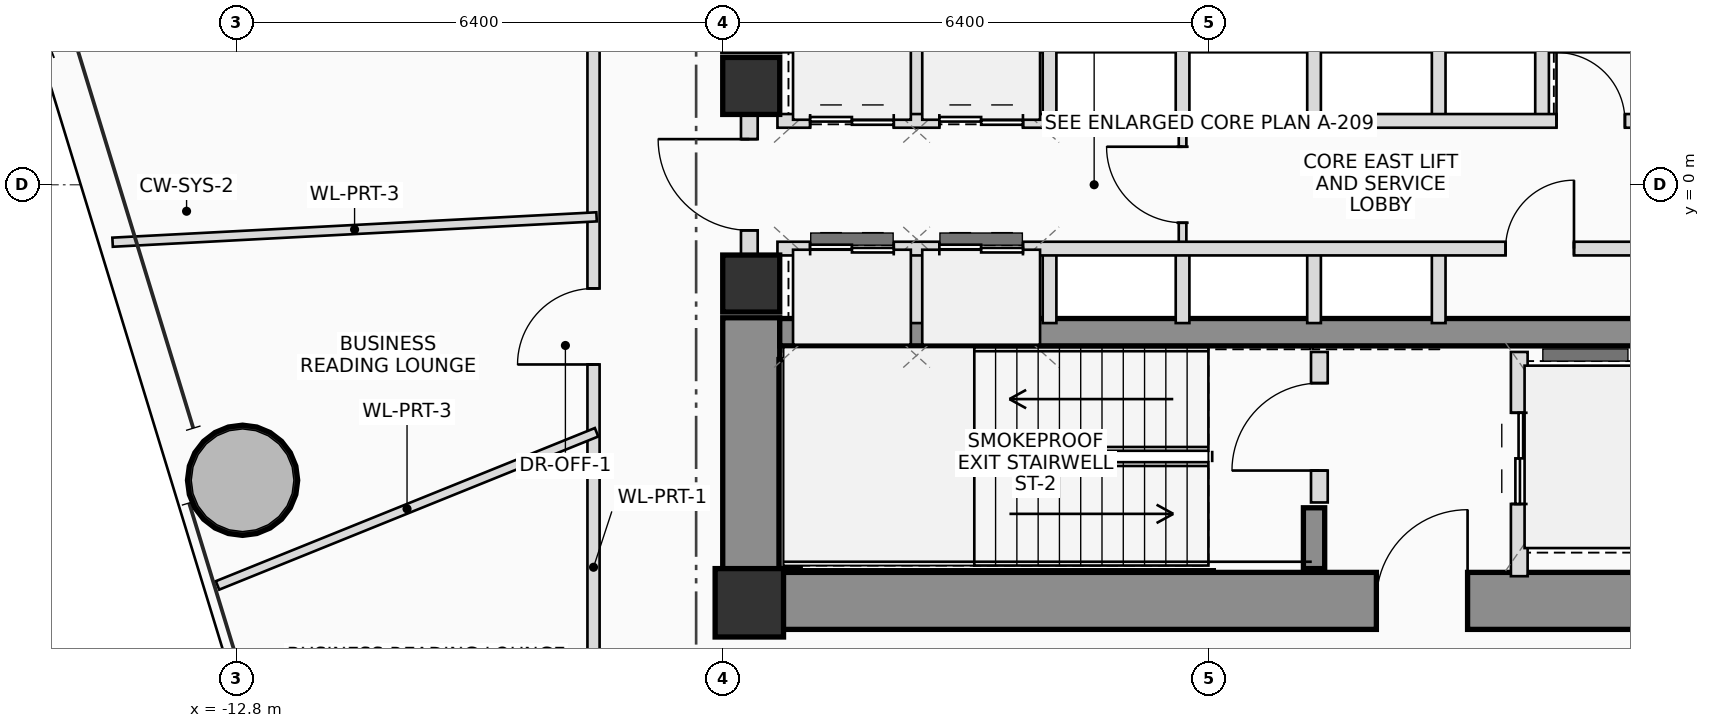
"""IFC4 building model, lengths in metres.
Left out: names, types, materials, properties, quantities, classifications, styles, units other than length and angle.
Written with IfcOpenShell. Run it as: python <this file> out.ifc"""

import sys

from ifc_helpers import new_model, si_unit, direction, frame, frame_2d, origin, origin_2d, place, context, subcontext, project, spatial, rectangle, hollow_circle, extrude, source, transform, mapped, element, fill, save


model = new_model("IFC4")
c1 = context("Model", 3, precision=1e-05, world=origin(), true_north=direction((0.0, 1.0)))
c2 = subcontext(c1, "Body", "Model", "MODEL_VIEW")
j1 = project(units=[si_unit("LENGTHUNIT", "METRE"), si_unit("PLANEANGLEUNIT", "RADIAN")], contexts=[c1])
p1 = place(None, origin())
s1 = spatial("IfcSite", under=j1, at=p1, CompositionType="ELEMENT")
p2 = place(p1, origin())
s2 = spatial("IfcBuilding", under=s1, at=p2, CompositionType="ELEMENT")
p3 = place(p2, frame((0.0, 0.0, 104.9)))
s3 = spatial("IfcBuildingStorey", under=s2, at=p3, CompositionType="ELEMENT", Elevation=104.9)
m1 = source(origin(), c2, "Body", "SweptSolid", [
    extrude(rectangle(XDim=0.9, YDim=0.9, at=origin_2d()), origin(), (0.0, 0.0, 1.0), 3.75),
])
p4 = place(p3, frame((-6.05, -5.5, 0.0), z_axis=(0.0, 0.0, 1.0), x_axis=(1.0, 0.0, 0.0)))
e1 = element("IfcColumn", 1, at=p4, inside=s3, PredefinedType="COLUMN", context=c2, shape_type="MappedRepresentation", body=[
    mapped(m1, transform((0.0, 0.0, 0.0), scale=1.0)),
])
p5 = place(p3, frame((-6.4, -5.475, 0.0), z_axis=(0.0, 0.0, 1.0), x_axis=(1.0, 0.0, 0.0)))
e2 = element("IfcWall", 2, at=p5, inside=s3, PredefinedType="SHEAR", context=c2, shape_type="SweptSolid", body=[
    extrude(rectangle(XDim=12.8, YDim=0.75, at=frame_2d((6.4, 0.0))), origin(), (0.0, 0.0, 1.0), 3.75),
])
p6 = place(p5, frame((8.6, 0.0, 0.0)))
e3 = element("IfcOpeningElement", 3, at=p6, cuts=e2, PredefinedType="OPENING", context=c2, shape_type="SweptSolid", body=[
    extrude(rectangle(XDim=1.2, YDim=2.2, at=frame_2d((0.6, 1.1))), frame((0.0, 0.385, 0.0), z_axis=(0.0, -1.0, 0.0), x_axis=(1.0, 0.0, 0.0)), (0.0, 0.0, 1.0), 0.77),
])
p7 = place(p3, frame((-6.025, -5.1, 0.0), z_axis=(0.0, 0.0, 1.0), x_axis=(0.0, 1.0, 0.0)))
e4 = element("IfcWall", 4, at=p7, inside=s3, PredefinedType="SHEAR", context=c2, shape_type="SweptSolid", body=[
    extrude(rectangle(XDim=3.35, YDim=0.75, at=frame_2d((1.675, 0.0))), origin(), (0.0, 0.0, 1.0), 3.75),
])
p8 = place(p3, frame((-5.65, -1.94, 0.0), z_axis=(0.0, 0.0, 1.0), x_axis=(1.0, 0.0, 0.0)))
e5 = element("IfcWall", 5, at=p8, inside=s3, PredefinedType="SHEAR", context=c2, shape_type="SweptSolid", body=[
    extrude(rectangle(XDim=11.3, YDim=0.36, at=frame_2d((5.65, 0.0))), origin(), (0.0, 0.0, 1.0), 3.75),
])
p9 = place(p3, frame((-5.52, -5.05, 0.0), z_axis=(0.0, 0.0, 1.0), x_axis=(0.0, 1.0, 0.0)))
e6 = element("IfcWall", 6, at=p9, inside=s3, PredefinedType="SHEAR", context=c2, shape_type="SweptSolid", body=[
    extrude(rectangle(XDim=2.75, YDim=0.28, at=frame_2d((1.375, 0.0))), origin(), (0.0, 0.0, 1.0), 3.75),
])
p10 = place(p3, frame((1.38, -5.05, 0.0), z_axis=(0.0, 0.0, 1.0), x_axis=(0.0, 1.0, 0.0)))
e7 = element("IfcWall", 7, at=p10, inside=s3, PredefinedType="SHEAR", context=c2, shape_type="SweptSolid", body=[
    extrude(rectangle(XDim=0.8, YDim=0.28, at=frame_2d((0.4, 0.0))), origin(), (0.0, 0.0, 1.0), 3.75),
])
m2 = source(origin(), c2, "Body", "SweptSolid", [
    extrude(rectangle(XDim=0.75, YDim=0.75, at=origin_2d()), origin(), (0.0, 0.0, 1.0), 3.75),
])
for number, where, z_axis, x_axis in (
    (8, (-6.025, -1.3, 0.0), (0.0, 0.0, 1.0), (1.0, 0.0, 0.0)),
    (9, (-6.025, 1.3, 0.0), (0.0, 0.0, 1.0), (1.0, 0.0, 0.0)),
):
    element("IfcColumn", number, at=place(p3, frame(where, z_axis=z_axis, x_axis=x_axis)), inside=s3, PredefinedType="COLUMN", context=c2, shape_type="MappedRepresentation", body=[
        mapped(m2, transform((0.0, 0.0, 0.0), scale=1.0)),
    ])
m3 = source(origin(), c2, "Body", "SweptSolid", [
    extrude(hollow_circle(Radius=0.725, WallThickness=0.05, at=origin_2d()), origin(), (0.0, 0.0, 1.0), 3.75),
])
p11 = place(p3, frame((-12.717, -3.888, 0.0), z_axis=(0.0, 0.0, 1.0), x_axis=(1.0, 0.0, 0.0)))
e10 = element("IfcColumn", 10, at=p11, inside=s3, PredefinedType="COLUMN", context=c2, shape_type="MappedRepresentation", body=[
    mapped(m3, transform((0.0, 0.0, 0.0), scale=1.0)),
])
p12 = place(p3, frame((-6.05, -0.95, 0.0), z_axis=(0.0, 0.0, 1.0), x_axis=(0.0, 1.0, 0.0)))
e11 = element("IfcWall", 11, at=p12, inside=s3, PredefinedType="PLUMBINGWALL", context=c2, shape_type="SweptSolid", body=[
    extrude(rectangle(XDim=1.9, YDim=0.22, at=frame_2d((0.95, 0.0))), origin(), (0.0, 0.0, 1.0), 2.525),
])
p13 = place(p12, frame((0.35, 0.0, 0.0)))
e12 = element("IfcOpeningElement", 12, at=p13, cuts=e11, PredefinedType="OPENING", context=c2, shape_type="SweptSolid", body=[
    extrude(rectangle(XDim=1.2, YDim=2.2, at=frame_2d((0.6, 1.1))), frame((0.0, 0.12, 0.0), z_axis=(0.0, -1.0, 0.0), x_axis=(1.0, 0.0, 0.0)), (0.0, 0.0, 1.0), 0.24),
])
p14 = place(p3, frame((1.45, -4.18, 0.0), z_axis=(0.0, 0.0, 1.0), x_axis=(0.0, 1.0, 0.0)))
e13 = element("IfcWall", 13, at=p14, inside=s3, PredefinedType="PLUMBINGWALL", context=c2, shape_type="SweptSolid", body=[
    extrude(rectangle(XDim=1.98, YDim=0.22, at=frame_2d((0.99, 0.0))), origin(), (0.0, 0.0, 1.0), 3.545),
])
p15 = place(p14, frame((0.42, 0.0, 0.0)))
e14 = element("IfcOpeningElement", 14, at=p15, cuts=e13, PredefinedType="OPENING", context=c2, shape_type="SweptSolid", body=[
    extrude(rectangle(XDim=1.15, YDim=2.15, at=frame_2d((0.575, 1.075))), frame((0.0, 0.12, 0.0), z_axis=(0.0, -1.0, 0.0), x_axis=(1.0, 0.0, 0.0)), (0.0, 0.0, 1.0), 0.24),
])
p16 = place(p3, frame((4.08, -5.15, 0.0), z_axis=(0.0, 0.0, 1.0), x_axis=(0.0, 1.0, 0.0)))
e15 = element("IfcWall", 15, at=p16, inside=s3, PredefinedType="PLUMBINGWALL", context=c2, shape_type="SweptSolid", body=[
    extrude(rectangle(XDim=2.95, YDim=0.22, at=frame_2d((1.475, 0.0))), origin(), (0.0, 0.0, 1.0), 3.545),
])
p17 = place(p16, frame((0.95, 0.0, 0.0)))
e16 = element("IfcOpeningElement", 16, at=p17, cuts=e15, PredefinedType="OPENING", context=c2, shape_type="SweptSolid", body=[
    extrude(rectangle(XDim=1.2, YDim=2.25, at=frame_2d((0.6, 1.125))), frame((0.0, 0.12, 0.0), z_axis=(0.0, -1.0, 0.0), x_axis=(1.0, 0.0, 0.0)), (0.0, 0.0, 1.0), 0.24),
])
p18 = place(p3, frame((-0.35, -0.84, 0.0), z_axis=(0.0, 0.0, 1.0), x_axis=(0.0, 1.0, 0.0)))
e17 = element("IfcWall", 17, at=p18, inside=s3, PredefinedType="PARTITIONING", context=c2, shape_type="SweptSolid", body=[
    extrude(rectangle(XDim=1.68, YDim=0.1, at=frame_2d((0.84, 0.0))), origin(), (0.0, 0.0, 1.0), 3.545),
])
p19 = place(p18, frame((0.34, 0.0, 0.0)))
e18 = element("IfcOpeningElement", 18, at=p19, cuts=e17, PredefinedType="OPENING", context=c2, shape_type="SweptSolid", body=[
    extrude(rectangle(XDim=1.0, YDim=2.25, at=frame_2d((0.5, 1.125))), frame((0.0, 0.06, 0.0), z_axis=(0.0, -1.0, 0.0), x_axis=(1.0, 0.0, 0.0)), (0.0, 0.0, 1.0), 0.12),
])
for number, where, z_axis, x_axis in (
    (19, (-3.85, 0.84, 0.0), (0.0, 0.0, 1.0), (0.0, 1.0, 0.0)),
    (20, (-3.85, -1.82, 0.0), (0.0, 0.0, 1.0), (0.0, 1.0, 0.0)),
    (21, (-2.1, 0.84, 0.0), (0.0, 0.0, 1.0), (0.0, 1.0, 0.0)),
    (22, (-2.1, -1.82, 0.0), (0.0, 0.0, 1.0), (0.0, 1.0, 0.0)),
    (23, (-0.35, 0.84, 0.0), (0.0, 0.0, 1.0), (0.0, 1.0, 0.0)),
    (24, (-0.35, -1.82, 0.0), (0.0, 0.0, 1.0), (0.0, 1.0, 0.0)),
    (25, (1.38, 0.84, 0.0), (0.0, 0.0, 1.0), (0.0, 1.0, 0.0)),
    (26, (1.38, -1.82, 0.0), (0.0, 0.0, 1.0), (0.0, 1.0, 0.0)),
    (27, (3.02, 0.84, 0.0), (0.0, 0.0, 1.0), (0.0, 1.0, 0.0)),
    (28, (4.38, 0.84, 0.0), (0.0, 0.0, 1.0), (0.0, 1.0, 0.0)),
    (29, (3.02, -1.82, 0.0), (0.0, 0.0, 1.0), (0.0, 1.0, 0.0)),
):
    element("IfcWall", number, at=place(p3, frame(where, z_axis=z_axis, x_axis=x_axis)), inside=s3, PredefinedType="PLUMBINGWALL", context=c2, shape_type="SweptSolid", body=[
        extrude(rectangle(XDim=0.98, YDim=0.18, at=frame_2d((0.49, 0.0))), origin(), (0.0, 0.0, 1.0), 3.545),
    ])
p20 = place(p3, frame((-5.68, 0.84, 0.0), z_axis=(0.0, 0.0, 1.0), x_axis=(1.0, 0.0, 0.0)))
e30 = element("IfcWall", 30, at=p20, inside=s3, PredefinedType="PLUMBINGWALL", context=c2, shape_type="SweptSolid", body=[
    extrude(rectangle(XDim=11.33, YDim=0.18, at=frame_2d((5.665, 0.0))), origin(), (0.0, 0.0, 1.0), 3.545),
])
p21 = place(p20, frame((0.43, 0.0, 0.0)))
e31 = element("IfcOpeningElement", 31, at=p21, cuts=e30, PredefinedType="OPENING", context=c2, shape_type="SweptSolid", body=[
    extrude(rectangle(XDim=1.1, YDim=2.2, at=frame_2d((0.55, 1.1))), frame((0.0, 0.1, 0.0), z_axis=(0.0, -1.0, 0.0), x_axis=(1.0, 0.0, 0.0)), (0.0, 0.0, 1.0), 0.2),
])
p22 = place(p20, frame((2.13, 0.0, 0.0)))
e32 = element("IfcOpeningElement", 32, at=p22, cuts=e30, PredefinedType="OPENING", context=c2, shape_type="SweptSolid", body=[
    extrude(rectangle(XDim=1.1, YDim=2.2, at=frame_2d((0.55, 1.1))), frame((0.0, 0.1, 0.0), z_axis=(0.0, -1.0, 0.0), x_axis=(1.0, 0.0, 0.0)), (0.0, 0.0, 1.0), 0.2),
])
p23 = place(p20, frame((10.25, 0.0, 0.0)))
e33 = element("IfcOpeningElement", 33, at=p23, cuts=e30, PredefinedType="OPENING", context=c2, shape_type="SweptSolid", body=[
    extrude(rectangle(XDim=0.9, YDim=2.05, at=frame_2d((0.45, 1.025))), frame((0.0, 0.1, 0.0), z_axis=(0.0, -1.0, 0.0), x_axis=(1.0, 0.0, 0.0)), (0.0, 0.0, 1.0), 0.2),
])
p24 = place(p3, frame((-5.68, -0.84, 0.0), z_axis=(0.0, 0.0, 1.0), x_axis=(1.0, 0.0, 0.0)))
e34 = element("IfcWall", 34, at=p24, inside=s3, PredefinedType="PLUMBINGWALL", context=c2, shape_type="SweptSolid", body=[
    extrude(rectangle(XDim=11.33, YDim=0.18, at=frame_2d((5.665, 0.0))), origin(), (0.0, 0.0, 1.0), 3.545),
])
p25 = place(p24, frame((0.43, 0.0, 0.0)))
e35 = element("IfcOpeningElement", 35, at=p25, cuts=e34, PredefinedType="OPENING", context=c2, shape_type="SweptSolid", body=[
    extrude(rectangle(XDim=1.1, YDim=2.2, at=frame_2d((0.55, 1.1))), frame((0.0, 0.1, 0.0), z_axis=(0.0, -1.0, 0.0), x_axis=(1.0, 0.0, 0.0)), (0.0, 0.0, 1.0), 0.2),
])
p26 = place(p24, frame((2.13, 0.0, 0.0)))
e36 = element("IfcOpeningElement", 36, at=p26, cuts=e34, PredefinedType="OPENING", context=c2, shape_type="SweptSolid", body=[
    extrude(rectangle(XDim=1.1, YDim=2.2, at=frame_2d((0.55, 1.1))), frame((0.0, 0.1, 0.0), z_axis=(0.0, -1.0, 0.0), x_axis=(1.0, 0.0, 0.0)), (0.0, 0.0, 1.0), 0.2),
])
p27 = place(p24, frame((9.58, 0.0, 0.0)))
e37 = element("IfcOpeningElement", 37, at=p27, cuts=e34, PredefinedType="OPENING", context=c2, shape_type="SweptSolid", body=[
    extrude(rectangle(XDim=0.9, YDim=2.05, at=frame_2d((0.45, 1.025))), frame((0.0, 0.1, 0.0), z_axis=(0.0, -1.0, 0.0), x_axis=(1.0, 0.0, 0.0)), (0.0, 0.0, 1.0), 0.2),
])
p28 = place(p3, frame((-8.1, -7.55, 0.0), z_axis=(0.0, 0.0, 1.0), x_axis=(0.0, 1.0, 0.0)))
e38 = element("IfcWall", 38, at=p28, inside=s3, PredefinedType="PARTITIONING", context=c2, shape_type="SweptSolid", body=[
    extrude(rectangle(XDim=15.1, YDim=0.16, at=frame_2d((7.55, 0.0))), origin(), (0.0, 0.0, 1.0), 2.85),
])
p29 = place(p28, frame((5.185, 0.0, 0.0)))
e39 = element("IfcOpeningElement", 39, at=p29, cuts=e38, PredefinedType="OPENING", context=c2, shape_type="SweptSolid", body=[
    extrude(rectangle(XDim=1.0, YDim=2.25, at=frame_2d((0.5, 1.125))), frame((0.0, 0.09, 0.0), z_axis=(0.0, -1.0, 0.0), x_axis=(1.0, 0.0, 0.0)), (0.0, 0.0, 1.0), 0.18),
])
p30 = place(p28, frame((9.39, 0.0, 0.0)))
e40 = element("IfcOpeningElement", 40, at=p30, cuts=e38, PredefinedType="OPENING", context=c2, shape_type="SweptSolid", body=[
    extrude(rectangle(XDim=1.0, YDim=2.25, at=frame_2d((0.5, 1.125))), frame((0.0, 0.09, 0.0), z_axis=(0.0, -1.0, 0.0), x_axis=(1.0, 0.0, 0.0)), (0.0, 0.0, 1.0), 0.18),
])
p31 = place(p28, frame((13.607, 0.0, 0.0)))
e41 = element("IfcOpeningElement", 41, at=p31, cuts=e38, PredefinedType="OPENING", context=c2, shape_type="SweptSolid", body=[
    extrude(rectangle(XDim=1.0, YDim=2.25, at=frame_2d((0.5, 1.125))), frame((0.0, 0.09, 0.0), z_axis=(0.0, -1.0, 0.0), x_axis=(1.0, 0.0, 0.0)), (0.0, 0.0, 1.0), 0.18),
])
p32 = place(p3, frame((-8.06, -0.422, 0.0), z_axis=(0.0, 0.0, 1.0), x_axis=(-0.998629334036, -0.052339786045, 0.0)))
e42 = element("IfcWall", 42, at=p32, inside=s3, PredefinedType="PARTITIONING", context=c2, shape_type="SweptSolid", body=[
    extrude(rectangle(XDim=6.376, YDim=0.12, at=frame_2d((3.188, 0.0))), origin(), (0.0, 0.0, 1.0), 3.01),
])
p33 = place(p3, frame((-8.06, -3.257, 0.0), z_axis=(0.0, 0.0, 1.0), x_axis=(-0.927184543748, -0.374604887627, 0.0)))
e43 = element("IfcWall", 43, at=p33, inside=s3, PredefinedType="PARTITIONING", context=c2, shape_type="SweptSolid", body=[
    extrude(rectangle(XDim=5.379, YDim=0.12, at=frame_2d((2.689, 0.0))), origin(), (0.0, 0.0, 1.0), 2.85),
])
p34 = place(p6, origin())
e44 = element("IfcDoor", 44, at=p34, inside=s3, OperationType="SINGLE_SWING_RIGHT", PredefinedType="DOOR", context=c2, shape_type="SweptSolid", body=[
    extrude(rectangle(XDim=1.2, YDim=2.2, at=frame_2d((0.6, 1.1))), frame((0.0, 0.025, 0.0), z_axis=(0.0, -1.0, 0.0), x_axis=(1.0, 0.0, 0.0)), (0.0, 0.0, 1.0), 0.05),
])
fill(e3, e44)
p35 = place(p13, origin())
e45 = element("IfcDoor", 45, at=p35, inside=s3, OperationType="SINGLE_SWING_RIGHT", PredefinedType="DOOR", context=c2, shape_type="SweptSolid", body=[
    extrude(rectangle(XDim=1.2, YDim=2.2, at=frame_2d((0.6, 1.1))), frame((0.0, 0.025, 0.0), z_axis=(0.0, -1.0, 0.0), x_axis=(1.0, 0.0, 0.0)), (0.0, 0.0, 1.0), 0.05),
])
fill(e12, e45)
p36 = place(p15, origin())
e46 = element("IfcDoor", 46, at=p36, inside=s3, OperationType="SINGLE_SWING_LEFT", PredefinedType="DOOR", context=c2, shape_type="SweptSolid", body=[
    extrude(rectangle(XDim=1.15, YDim=2.15, at=frame_2d((0.575, 1.075))), frame((0.0, 0.025, 0.0), z_axis=(0.0, -1.0, 0.0), x_axis=(1.0, 0.0, 0.0)), (0.0, 0.0, 1.0), 0.05),
])
fill(e14, e46)
p37 = place(p17, origin())
e47 = element("IfcDoor", 47, at=p37, inside=s3, OperationType="DOUBLE_DOOR_SLIDING", PredefinedType="DOOR", context=c2, shape_type="SweptSolid", body=[
    extrude(rectangle(XDim=1.2, YDim=2.25, at=frame_2d((0.6, 1.125))), frame((0.0, 0.025, 0.0), z_axis=(0.0, -1.0, 0.0), x_axis=(1.0, 0.0, 0.0)), (0.0, 0.0, 1.0), 0.05),
])
fill(e16, e47)
p38 = place(p19, origin())
e48 = element("IfcDoor", 48, at=p38, inside=s3, OperationType="SINGLE_SWING_RIGHT", PredefinedType="DOOR", context=c2, shape_type="SweptSolid", body=[
    extrude(rectangle(XDim=1.0, YDim=2.25, at=frame_2d((0.5, 1.125))), frame((0.0, 0.025, 0.0), z_axis=(0.0, -1.0, 0.0), x_axis=(1.0, 0.0, 0.0)), (0.0, 0.0, 1.0), 0.05),
])
fill(e18, e48)
p39 = place(p21, origin())
e49 = element("IfcDoor", 49, at=p39, inside=s3, OperationType="DOUBLE_DOOR_SLIDING", PredefinedType="DOOR", context=c2, shape_type="SweptSolid", body=[
    extrude(rectangle(XDim=1.1, YDim=2.2, at=frame_2d((0.55, 1.1))), frame((0.0, 0.025, 0.0), z_axis=(0.0, -1.0, 0.0), x_axis=(1.0, 0.0, 0.0)), (0.0, 0.0, 1.0), 0.05),
])
fill(e31, e49)
p40 = place(p22, origin())
e50 = element("IfcDoor", 50, at=p40, inside=s3, OperationType="DOUBLE_DOOR_SLIDING", PredefinedType="DOOR", context=c2, shape_type="SweptSolid", body=[
    extrude(rectangle(XDim=1.1, YDim=2.2, at=frame_2d((0.55, 1.1))), frame((0.0, 0.025, 0.0), z_axis=(0.0, -1.0, 0.0), x_axis=(1.0, 0.0, 0.0)), (0.0, 0.0, 1.0), 0.05),
])
fill(e32, e50)
p41 = place(p23, origin())
e51 = element("IfcDoor", 51, at=p41, inside=s3, OperationType="SINGLE_SWING_LEFT", PredefinedType="DOOR", context=c2, shape_type="SweptSolid", body=[
    extrude(rectangle(XDim=0.9, YDim=2.05, at=frame_2d((0.45, 1.025))), frame((0.0, 0.025, 0.0), z_axis=(0.0, -1.0, 0.0), x_axis=(1.0, 0.0, 0.0)), (0.0, 0.0, 1.0), 0.05),
])
fill(e33, e51)
p42 = place(p25, origin())
e52 = element("IfcDoor", 52, at=p42, inside=s3, OperationType="DOUBLE_DOOR_SLIDING", PredefinedType="DOOR", context=c2, shape_type="SweptSolid", body=[
    extrude(rectangle(XDim=1.1, YDim=2.2, at=frame_2d((0.55, 1.1))), frame((0.0, 0.025, 0.0), z_axis=(0.0, -1.0, 0.0), x_axis=(1.0, 0.0, 0.0)), (0.0, 0.0, 1.0), 0.05),
])
fill(e35, e52)
p43 = place(p26, origin())
e53 = element("IfcDoor", 53, at=p43, inside=s3, OperationType="DOUBLE_DOOR_SLIDING", PredefinedType="DOOR", context=c2, shape_type="SweptSolid", body=[
    extrude(rectangle(XDim=1.1, YDim=2.2, at=frame_2d((0.55, 1.1))), frame((0.0, 0.025, 0.0), z_axis=(0.0, -1.0, 0.0), x_axis=(1.0, 0.0, 0.0)), (0.0, 0.0, 1.0), 0.05),
])
fill(e36, e53)
p44 = place(p27, origin())
e54 = element("IfcDoor", 54, at=p44, inside=s3, OperationType="SINGLE_SWING_RIGHT", PredefinedType="DOOR", context=c2, shape_type="SweptSolid", body=[
    extrude(rectangle(XDim=0.9, YDim=2.05, at=frame_2d((0.45, 1.025))), frame((0.0, 0.025, 0.0), z_axis=(0.0, -1.0, 0.0), x_axis=(1.0, 0.0, 0.0)), (0.0, 0.0, 1.0), 0.05),
])
fill(e37, e54)
p45 = place(p29, origin())
e55 = element("IfcDoor", 55, at=p45, inside=s3, OperationType="SINGLE_SWING_LEFT", PredefinedType="DOOR", context=c2, shape_type="SweptSolid", body=[
    extrude(rectangle(XDim=1.0, YDim=2.25, at=frame_2d((0.5, 1.125))), frame((0.0, 0.025, 0.0), z_axis=(0.0, -1.0, 0.0), x_axis=(1.0, 0.0, 0.0)), (0.0, 0.0, 1.0), 0.05),
])
fill(e39, e55)
save(model, sys.argv[1])
